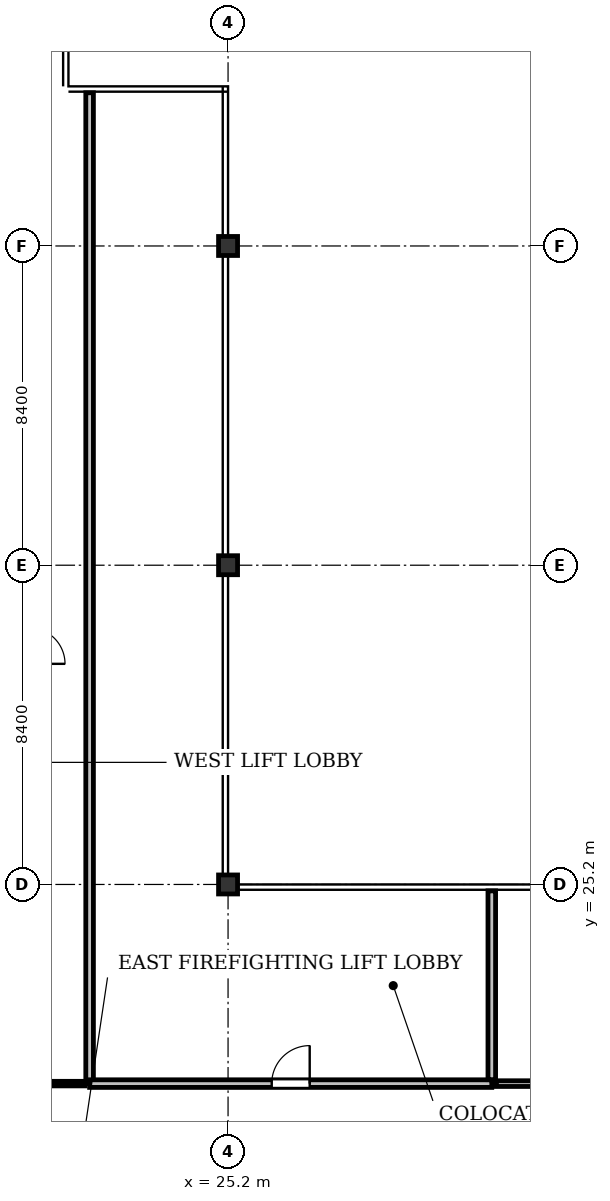
"""IFC4 building model, lengths in metres.
Left out: names, types, materials, properties, quantities, classifications, styles, units other than length and angle.
Written with IfcOpenShell. Run it as: python <this file> out.ifc"""

import sys

from ifc_helpers import new_model, si_unit, direction, frame, frame_2d, origin, origin_2d, place, context, subcontext, project, spatial, rectangle, i_section, extrude, element, fill, save


model = new_model("IFC4")
c1 = context("Model", 3, precision=1e-05, world=origin(), true_north=direction((0.0, 1.0)))
c2 = subcontext(c1, "Body", "Model", "MODEL_VIEW")
j1 = project(units=[si_unit("LENGTHUNIT", "METRE"), si_unit("PLANEANGLEUNIT", "RADIAN")], contexts=[c1])
p1 = place(None, origin())
s1 = spatial("IfcSite", under=j1, at=p1, CompositionType="ELEMENT")
p2 = place(p1, origin())
s2 = spatial("IfcBuilding", under=s1, at=p2, CompositionType="ELEMENT")
p3 = place(p2, frame((0.0, 0.0, 71.0)))
s3 = spatial("IfcBuildingStorey", under=s2, at=p3, CompositionType="ELEMENT", Elevation=71.0)
for number, where, z_axis, x_axis in (
    (1, (25.2, 25.2, 0.0), (0.0, 0.0, 1.0), (1.0, 0.0, 0.0)),
    (2, (25.2, 33.6, 0.0), (0.0, 0.0, 1.0), (1.0, 0.0, 0.0)),
    (3, (25.2, 42.0, 0.0), (0.0, 0.0, 1.0), (1.0, 0.0, 0.0)),
):
    element("IfcColumn", number, at=place(p3, frame(where, z_axis=z_axis, x_axis=x_axis)), inside=s3, PredefinedType="COLUMN", context=c2, shape_type="SweptSolid", body=[
        extrude(i_section(OverallWidth=0.5, OverallDepth=0.5, WebThickness=0.028, FlangeThickness=0.04, at=origin_2d()), origin(), (0.0, 0.0, 1.0), 4.2),
    ])
p4 = place(p3, frame((21.557, 46.031, 0.0), z_axis=(0.0, 0.0, 1.0), x_axis=(0.0, -1.0, 0.0)))
e4 = element("IfcWall", 4, at=p4, inside=s3, PredefinedType="PARTITIONING", context=c2, shape_type="SweptSolid", body=[
    extrude(rectangle(XDim=26.071, YDim=0.2, at=frame_2d((13.036, 0.0))), origin(), (0.0, 0.0, 1.0), 3.313),
])
p5 = place(p3, frame((21.557, 19.96, 0.0), z_axis=(0.0, 0.0, 1.0), x_axis=(1.0, 0.0, 0.0)))
e5 = element("IfcWall", 5, at=p5, inside=s3, PredefinedType="PARTITIONING", context=c2, shape_type="SweptSolid", body=[
    extrude(rectangle(XDim=10.583, YDim=0.2, at=frame_2d((5.292, 0.0))), origin(), (0.0, 0.0, 1.0), 3.323),
])
p6 = place(p5, frame((4.792, 0.0, 0.0)))
e6 = element("IfcOpeningElement", 6, at=p6, cuts=e5, PredefinedType="OPENING", context=c2, shape_type="SweptSolid", body=[
    extrude(rectangle(XDim=1.0, YDim=2.15, at=frame_2d((0.5, 1.075))), frame((0.0, 0.11, 0.0), z_axis=(0.0, -1.0, 0.0), x_axis=(1.0, 0.0, 0.0)), (0.0, 0.0, 1.0), 0.22),
])
p7 = place(p3, frame((32.14, 20.064, 0.0), z_axis=(0.0, 0.0, 1.0), x_axis=(0.0, 1.0, 0.0)))
e7 = element("IfcWall", 7, at=p7, inside=s3, PredefinedType="PARTITIONING", context=c2, shape_type="SweptSolid", body=[
    extrude(rectangle(XDim=4.967, YDim=0.2, at=frame_2d((2.483, 0.0))), origin(), (0.0, 0.0, 1.0), 3.925),
])
p8 = place(p3, frame((32.26, 19.96, 0.0), z_axis=(0.0, 0.0, 1.0), x_axis=(0.999999999751, -2.2304501e-05, 0.0)))
e8 = element("IfcWall", 8, at=p8, inside=s3, PredefinedType="PARTITIONING", context=c2, shape_type="SweptSolid", body=[
    extrude(rectangle(XDim=10.946, YDim=0.15, at=frame_2d((5.473, 0.0))), origin(), (0.0, 0.0, 1.0), 3.323),
])
p9 = place(p3, frame((20.039, 19.96, 0.0), z_axis=(0.0, 0.0, 1.0), x_axis=(1.0, 0.0, 0.0)))
e9 = element("IfcWall", 9, at=p9, inside=s3, PredefinedType="PARTITIONING", context=c2, shape_type="SweptSolid", body=[
    extrude(rectangle(XDim=1.398, YDim=0.12, at=frame_2d((0.699, 0.0))), origin(), (0.0, 0.0, 1.0), 3.566),
])
p10 = place(p6, origin())
e10 = element("IfcDoor", 10, at=p10, inside=s3, OperationType="SINGLE_SWING_RIGHT", PredefinedType="DOOR", context=c2, shape_type="SweptSolid", body=[
    extrude(rectangle(XDim=1.0, YDim=2.15, at=frame_2d((0.5, 1.075))), frame((0.0, 0.025, 0.0), z_axis=(0.0, -1.0, 0.0), x_axis=(1.0, 0.0, 0.0)), (0.0, 0.0, 1.0), 0.05),
])
fill(e6, e10)
save(model, sys.argv[1])
